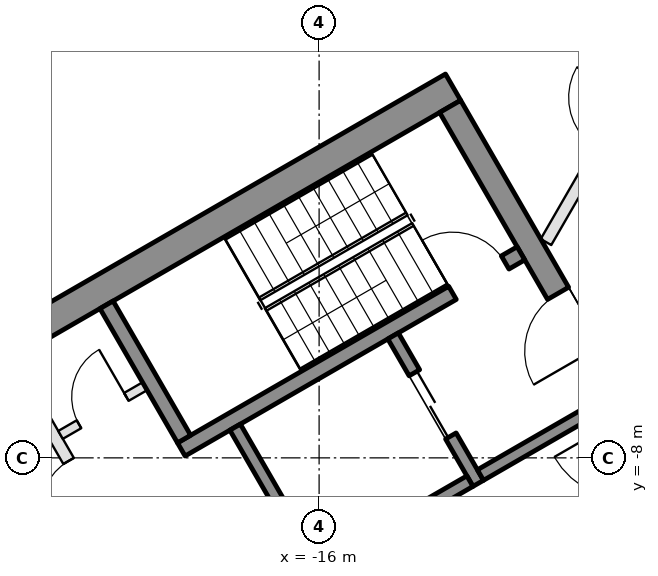
"""IFC4 building model, lengths in metres.
Left out: names, types, materials, properties, quantities, classifications, styles, units other than length and angle.
Written with IfcOpenShell. Run it as: python <this file> out.ifc"""

import sys

from ifc_helpers import new_model, si_unit, direction, frame, frame_2d, origin, place, context, subcontext, project, spatial, rectangle, extrude, element, fill, save


model = new_model("IFC4")
c1 = context("Model", 3, precision=1e-05, world=origin(), true_north=direction((0.0, 1.0)))
c2 = subcontext(c1, "Body", "Model", "MODEL_VIEW")
j1 = project(units=[si_unit("LENGTHUNIT", "METRE"), si_unit("PLANEANGLEUNIT", "RADIAN")], contexts=[c1])
p1 = place(None, origin())
s1 = spatial("IfcSite", under=j1, at=p1, CompositionType="ELEMENT")
p2 = place(p1, origin())
s2 = spatial("IfcBuilding", under=s1, at=p2, CompositionType="ELEMENT")
p3 = place(p2, frame((0.0, 0.0, 150.3)))
s3 = spatial("IfcBuildingStorey", under=s2, at=p3, CompositionType="ELEMENT", Elevation=150.3)
p4 = place(p3, frame((-20.309, 1.934, 0.0), z_axis=(0.0, 0.0, 1.0), x_axis=(-0.499992114976, -0.866029956157, 0.0)))
e1 = element("IfcWall", 1, at=p4, inside=s3, PredefinedType="SOLIDWALL", context=c2, shape_type="SweptSolid", body=[
    extrude(rectangle(XDim=6.74, YDim=0.35, at=frame_2d((3.37, 0.0))), origin(), (0.0, 0.0, 1.0), 3.55),
])
p5 = place(p4, frame((0.77, 0.0, 0.0)))
e2 = element("IfcOpeningElement", 2, at=p5, cuts=e1, PredefinedType="OPENING", context=c2, shape_type="SweptSolid", body=[
    extrude(rectangle(XDim=2.4, YDim=2.4, at=frame_2d((1.2, 1.2))), frame((0.0, 0.185, 0.0), z_axis=(0.0, -1.0, 0.0), x_axis=(1.0, 0.0, 0.0)), (0.0, 0.0, 1.0), 0.37),
])
p6 = place(p4, frame((3.47, 0.0, 0.3)))
e3 = element("IfcOpeningElement", 3, at=p6, cuts=e1, PredefinedType="OPENING", context=c2, shape_type="SweptSolid", body=[
    extrude(rectangle(XDim=2.9, YDim=2.65, at=frame_2d((1.45, 1.325))), frame((0.0, 0.185, 0.0), z_axis=(0.0, -1.0, 0.0), x_axis=(1.0, 0.0, 0.0)), (0.0, 0.0, 1.0), 0.37),
])
p7 = place(p3, frame((-13.797, -1.903, 0.0), z_axis=(0.0, 0.0, 1.0), x_axis=(-0.866025009528, -0.500000682871, 0.0)))
e4 = element("IfcWall", 4, at=p7, inside=s3, PredefinedType="SHEAR", context=c2, shape_type="SweptSolid", body=[
    extrude(rectangle(XDim=14.837, YDim=0.5, at=frame_2d((7.418, 0.0))), origin(), (0.0, 0.0, 1.0), 3.5),
])
p8 = place(p3, frame((-13.845, -2.22, 0.0), z_axis=(0.0, 0.0, 1.0), x_axis=(0.500004234368, -0.866022959057, 0.0)))
e5 = element("IfcWall", 5, at=p8, inside=s3, PredefinedType="SHEAR", context=c2, shape_type="SweptSolid", body=[
    extrude(rectangle(XDim=10.0, YDim=0.4, at=frame_2d((5.0, 0.0))), origin(), (0.0, 0.0, 1.0), 3.5),
])
p9 = place(p8, frame((3.55, 0.0, 0.0)))
e6 = element("IfcOpeningElement", 6, at=p9, cuts=e5, PredefinedType="OPENING", context=c2, shape_type="SweptSolid", body=[
    extrude(rectangle(XDim=1.1, YDim=2.1, at=frame_2d((0.55, 1.05))), frame((0.0, 0.21, 0.0), z_axis=(0.0, -1.0, 0.0), x_axis=(1.0, 0.0, 0.0)), (0.0, 0.0, 1.0), 0.42),
])
p10 = place(p8, frame((5.85, 0.0, 0.0)))
e7 = element("IfcOpeningElement", 7, at=p10, cuts=e5, PredefinedType="OPENING", context=c2, shape_type="SweptSolid", body=[
    extrude(rectangle(XDim=1.4, YDim=2.1, at=frame_2d((0.7, 1.05))), frame((0.0, 0.21, 0.0), z_axis=(0.0, -1.0, 0.0), x_axis=(1.0, 0.0, 0.0)), (0.0, 0.0, 1.0), 0.42),
])
p11 = place(p3, frame((-12.681, -4.636, 0.0), z_axis=(0.0, 0.0, 1.0), x_axis=(-0.866021702275, -0.500006411147, 0.0)))
e8 = element("IfcWall", 8, at=p11, inside=s3, PredefinedType="SHEAR", context=c2, shape_type="SweptSolid", body=[
    extrude(rectangle(XDim=6.45, YDim=0.25, at=frame_2d((3.225, 0.0))), origin(), (0.0, 0.0, 1.0), 3.5),
])
p12 = place(p11, frame((0.3, 0.0, 0.0)))
e9 = element("IfcOpeningElement", 9, at=p12, cuts=e8, PredefinedType="OPENING", context=c2, shape_type="SweptSolid", body=[
    extrude(rectangle(XDim=1.0, YDim=2.1, at=frame_2d((0.5, 1.05))), frame((0.0, 0.135, 0.0), z_axis=(0.0, -1.0, 0.0), x_axis=(1.0, 0.0, 0.0)), (0.0, 0.0, 1.0), 0.27),
])
p13 = place(p3, frame((-19.496, -5.482, 0.0), z_axis=(0.0, 0.0, 1.0), x_axis=(0.499990435942, -0.866030925526, 0.0)))
e10 = element("IfcWall", 10, at=p13, inside=s3, PredefinedType="SHEAR", context=c2, shape_type="SweptSolid", body=[
    extrude(rectangle(XDim=2.55, YDim=0.25, at=frame_2d((1.275, 0.0))), origin(), (0.0, 0.0, 1.0), 3.5),
])
p14 = place(p3, frame((-17.381, -7.495, 0.0), z_axis=(0.0, 0.0, 1.0), x_axis=(0.500011755427, -0.866018616679, 0.0)))
e11 = element("IfcWall", 11, at=p14, inside=s3, PredefinedType="SHEAR", context=c2, shape_type="SweptSolid", body=[
    extrude(rectangle(XDim=2.8, YDim=0.2, at=frame_2d((1.4, 0.0))), origin(), (0.0, 0.0, 1.0), 3.5),
])
p15 = place(p3, frame((-14.783, -5.995, 0.0), z_axis=(0.0, 0.0, 1.0), x_axis=(0.49994636267, -0.866056369097, 0.0)))
e12 = element("IfcWall", 12, at=p15, inside=s3, PredefinedType="SHEAR", context=c2, shape_type="SweptSolid", body=[
    extrude(rectangle(XDim=2.8, YDim=0.2, at=frame_2d((1.4, 0.0))), origin(), (0.0, 0.0, 1.0), 3.5),
])
p16 = place(p15, frame((0.7, 0.0, 0.0)))
e13 = element("IfcOpeningElement", 13, at=p16, cuts=e12, PredefinedType="OPENING", context=c2, shape_type="SweptSolid", body=[
    extrude(rectangle(XDim=1.2, YDim=2.1, at=frame_2d((0.6, 1.05))), frame((0.0, 0.11, 0.0), z_axis=(0.0, -1.0, 0.0), x_axis=(1.0, 0.0, 0.0)), (0.0, 0.0, 1.0), 0.22),
])
p17 = place(p3, frame((-13.52, -8.383, 0.0), z_axis=(0.0, 0.0, 1.0), x_axis=(-0.866034573852, -0.49998411664, 0.0)))
e14 = element("IfcWall", 14, at=p17, inside=s3, PredefinedType="SHEAR", context=c2, shape_type="SweptSolid", body=[
    extrude(rectangle(XDim=2.8, YDim=0.2, at=frame_2d((1.4, 0.0))), origin(), (0.0, 0.0, 1.0), 3.5),
])
p18 = place(p3, frame((-11.268, -7.083, 0.0), z_axis=(0.0, 0.0, 1.0), x_axis=(-0.866050077142, -0.499957262057, 0.0)))
e15 = element("IfcWall", 15, at=p18, inside=s3, PredefinedType="SHEAR", context=c2, shape_type="SweptSolid", body=[
    extrude(rectangle(XDim=2.4, YDim=0.2, at=frame_2d((1.2, 0.0))), origin(), (0.0, 0.0, 1.0), 3.5),
])
p19 = place(p3, frame((-21.076, -6.395, 0.0), z_axis=(0.0, 0.0, 1.0), x_axis=(0.50001468107, -0.866016927499, 0.0)))
e16 = element("IfcWall", 16, at=p19, inside=s3, PredefinedType="PARTITIONING", context=c2, shape_type="SweptSolid", body=[
    extrude(rectangle(XDim=5.4, YDim=0.2, at=frame_2d((2.7, 0.0))), origin(), (0.0, 0.0, 1.0), 3.5),
])
p20 = place(p19, frame((1.913, 0.0, 0.0)))
e17 = element("IfcOpeningElement", 17, at=p20, cuts=e16, PredefinedType="OPENING", context=c2, shape_type="SweptSolid", body=[
    extrude(rectangle(XDim=0.9, YDim=2.1, at=frame_2d((0.45, 1.05))), frame((0.0, 0.11, 0.0), z_axis=(0.0, -1.0, 0.0), x_axis=(1.0, 0.0, 0.0)), (0.0, 0.0, 1.0), 0.22),
])
p21 = place(p19, frame((3.788, 0.0, 0.0)))
e18 = element("IfcOpeningElement", 18, at=p21, cuts=e16, PredefinedType="OPENING", context=c2, shape_type="SweptSolid", body=[
    extrude(rectangle(XDim=0.9, YDim=2.1, at=frame_2d((0.45, 1.05))), frame((0.0, 0.11, 0.0), z_axis=(0.0, -1.0, 0.0), x_axis=(1.0, 0.0, 0.0)), (0.0, 0.0, 1.0), 0.22),
])
p22 = place(p3, frame((-18.866, -6.822, 0.0), z_axis=(0.0, 0.0, 1.0), x_axis=(-0.866028054938, -0.499995408039, 0.0)))
e19 = element("IfcWall", 19, at=p22, inside=s3, PredefinedType="PARTITIONING", context=c2, shape_type="SweptSolid", body=[
    extrude(rectangle(XDim=1.6, YDim=0.15, at=frame_2d((0.8, 0.0))), origin(), (0.0, 0.0, 1.0), 3.5),
])
p23 = place(p22, frame((0.35, 0.0, 0.0)))
e20 = element("IfcOpeningElement", 20, at=p23, cuts=e19, PredefinedType="OPENING", context=c2, shape_type="SweptSolid", body=[
    extrude(rectangle(XDim=0.9, YDim=2.1, at=frame_2d((0.45, 1.05))), frame((0.0, 0.085, 0.0), z_axis=(0.0, -1.0, 0.0), x_axis=(1.0, 0.0, 0.0)), (0.0, 0.0, 1.0), 0.17),
])
p24 = place(p3, frame((-12.269, -4.45, 0.0), z_axis=(0.0, 0.0, 1.0), x_axis=(0.500000259638, 0.866025253883, 0.0)))
e21 = element("IfcWall", 21, at=p24, inside=s3, PredefinedType="PARTITIONING", context=c2, shape_type="SweptSolid", body=[
    extrude(rectangle(XDim=4.488, YDim=0.2, at=frame_2d((2.244, 0.0))), origin(), (0.0, 0.0, 1.0), 2.95),
])
p25 = place(p24, frame((1.744, 0.0, 0.0)))
e22 = element("IfcOpeningElement", 22, at=p25, cuts=e21, PredefinedType="OPENING", context=c2, shape_type="SweptSolid", body=[
    extrude(rectangle(XDim=1.0, YDim=2.1, at=frame_2d((0.5, 1.05))), frame((0.0, 0.11, 0.0), z_axis=(0.0, -1.0, 0.0), x_axis=(1.0, 0.0, 0.0)), (0.0, 0.0, 1.0), 0.22),
])
p26 = place(p16, origin())
e23 = element("IfcDoor", 23, at=p26, inside=s3, OperationType="DOUBLE_DOOR_SLIDING", PredefinedType="DOOR", context=c2, shape_type="SweptSolid", body=[
    extrude(rectangle(XDim=1.2, YDim=2.1, at=frame_2d((0.6, 1.05))), frame((0.0, 0.025, 0.0), z_axis=(0.0, -1.0, 0.0), x_axis=(1.0, 0.0, 0.0)), (0.0, 0.0, 1.0), 0.05),
])
fill(e13, e23)
p27 = place(p23, frame((0.9, 0.0, 0.0), z_axis=(0.0, 0.0, 1.0), x_axis=(-1.0, 0.0, 0.0)))
e24 = element("IfcDoor", 24, at=p27, inside=s3, OperationType="SINGLE_SWING_RIGHT", PredefinedType="DOOR", context=c2, shape_type="SweptSolid", body=[
    extrude(rectangle(XDim=0.9, YDim=2.1, at=frame_2d((0.45, 1.05))), frame((0.0, 0.025, 0.0), z_axis=(0.0, -1.0, 0.0), x_axis=(1.0, 0.0, 0.0)), (0.0, 0.0, 1.0), 0.05),
])
fill(e20, e24)
p28 = place(p20, frame((0.9, 0.0, 0.0), z_axis=(0.0, 0.0, 1.0), x_axis=(-1.0, 0.0, 0.0)))
e25 = element("IfcDoor", 25, at=p28, inside=s3, OperationType="SINGLE_SWING_LEFT", PredefinedType="DOOR", context=c2, shape_type="SweptSolid", body=[
    extrude(rectangle(XDim=0.9, YDim=2.1, at=frame_2d((0.45, 1.05))), frame((0.0, 0.025, 0.0), z_axis=(0.0, -1.0, 0.0), x_axis=(1.0, 0.0, 0.0)), (0.0, 0.0, 1.0), 0.05),
])
fill(e17, e25)
p29 = place(p9, frame((1.1, 0.0, 0.0), z_axis=(0.0, 0.0, 1.0), x_axis=(-1.0, 0.0, 0.0)))
e26 = element("IfcDoor", 26, at=p29, inside=s3, OperationType="SINGLE_SWING_LEFT", PredefinedType="DOOR", context=c2, shape_type="SweptSolid", body=[
    extrude(rectangle(XDim=1.1, YDim=2.1, at=frame_2d((0.55, 1.05))), frame((0.0, 0.025, 0.0), z_axis=(0.0, -1.0, 0.0), x_axis=(1.0, 0.0, 0.0)), (0.0, 0.0, 1.0), 0.05),
])
fill(e6, e26)
p30 = place(p12, frame((1.0, 0.0, 0.0), z_axis=(0.0, 0.0, 1.0), x_axis=(-1.0, 0.0, 0.0)))
e27 = element("IfcDoor", 27, at=p30, inside=s3, OperationType="SINGLE_SWING_LEFT", PredefinedType="DOOR", context=c2, shape_type="SweptSolid", body=[
    extrude(rectangle(XDim=1.0, YDim=2.1, at=frame_2d((0.5, 1.05))), frame((0.0, 0.025, 0.0), z_axis=(0.0, -1.0, 0.0), x_axis=(1.0, 0.0, 0.0)), (0.0, 0.0, 1.0), 0.05),
])
fill(e9, e27)
save(model, sys.argv[1])
